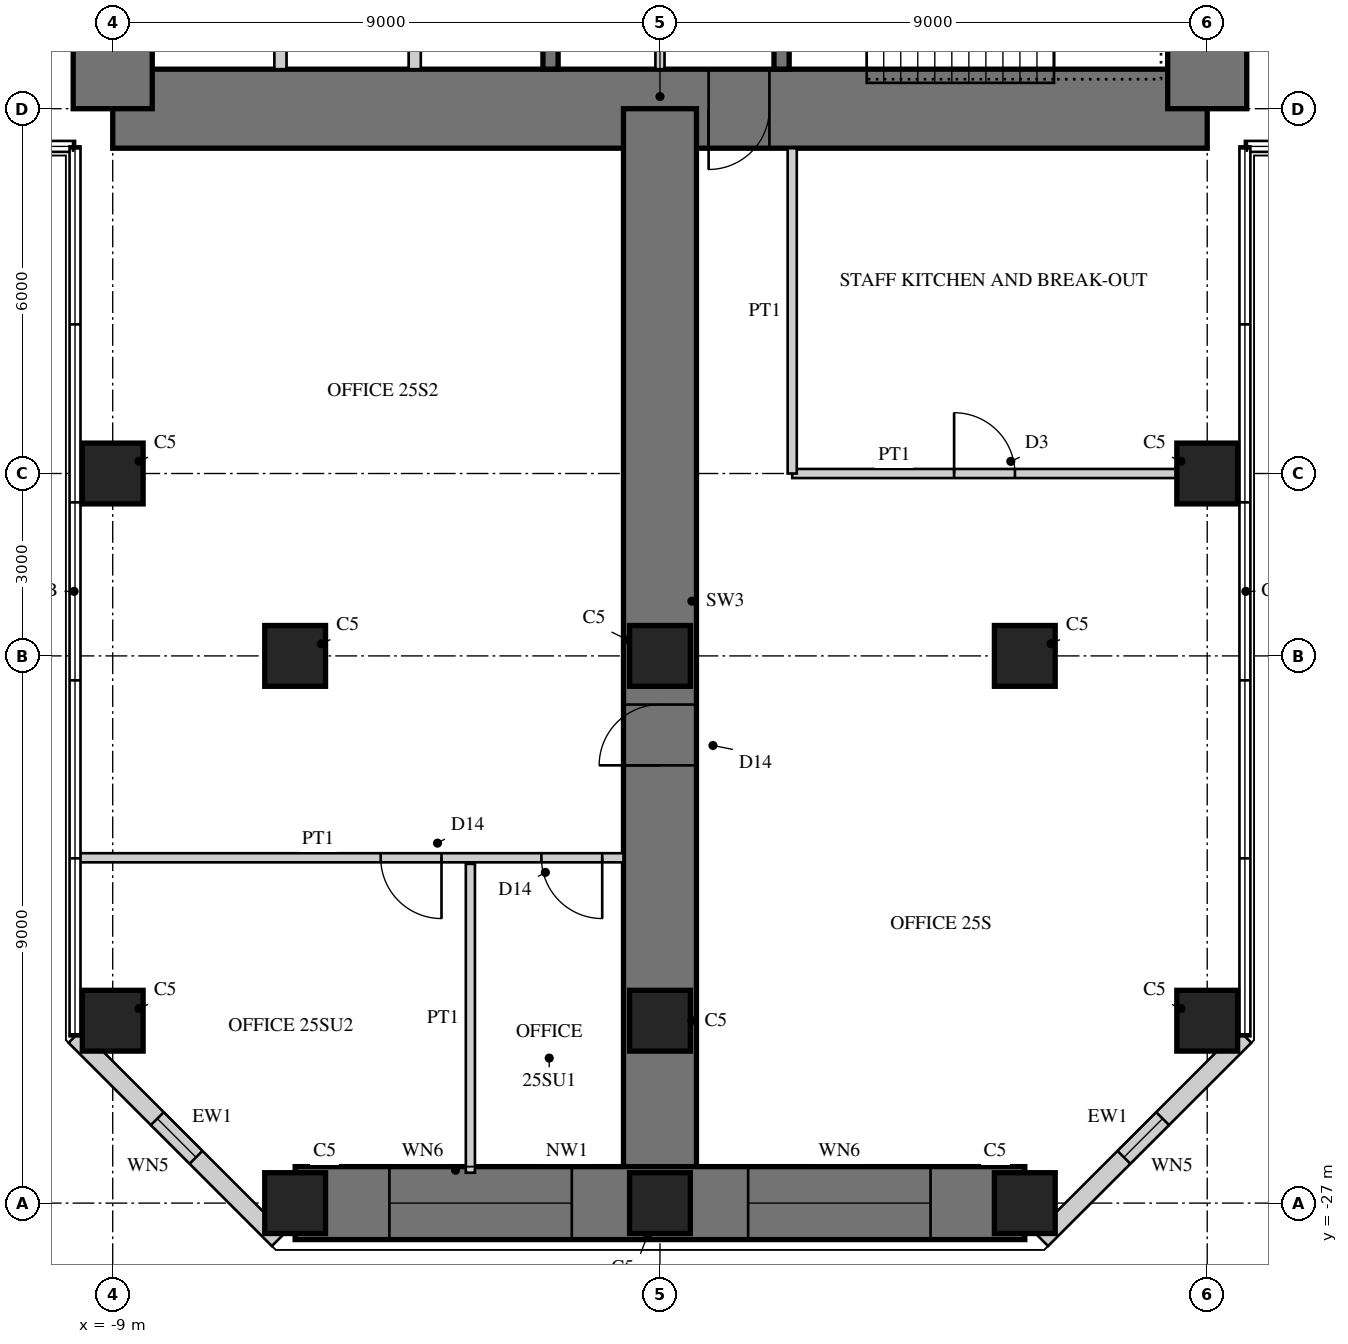
"""IFC4 building model, lengths in metres.
Left out: names, types, materials, properties, quantities, classifications, styles, units other than length and angle.
Written with IfcOpenShell. Run it as: python <this file> out.ifc"""

import sys

from ifc_helpers import new_model, si_unit, direction, frame, frame_2d, origin, origin_2d, place, context, subcontext, project, spatial, rectangle, hollow_rectangle, extrude, element, fill, save


model = new_model("IFC4")
c1 = context("Model", 3, precision=1e-05, world=origin(), true_north=direction((0.0, 1.0)))
c2 = subcontext(c1, "Body", "Model", "MODEL_VIEW")
j1 = project(units=[si_unit("LENGTHUNIT", "METRE"), si_unit("PLANEANGLEUNIT", "RADIAN")], contexts=[c1])
p1 = place(None, origin())
s1 = spatial("IfcSite", under=j1, at=p1, CompositionType="ELEMENT")
p2 = place(p1, origin())
s2 = spatial("IfcBuilding", under=s1, at=p2, CompositionType="ELEMENT")
p3 = place(p2, frame((0.0, 0.0, 104.5)))
s3 = spatial("IfcBuildingStorey", under=s2, at=p3, CompositionType="ELEMENT", Elevation=104.5)
p4 = place(p3, frame((-9.0, -9.0, 0.0), z_axis=(0.0, 0.0, 1.0), x_axis=(1.0, 0.0, 0.0)))
e1 = element("IfcWall", 1, at=p4, inside=s3, PredefinedType="SHEAR", context=c2, shape_type="SweptSolid", body=[
    extrude(rectangle(XDim=18.0, YDim=1.3, at=frame_2d((9.0, 0.0))), origin(), (0.0, 0.0, 1.0), 4.0),
])
p5 = place(p4, frame((9.8, 0.0, 0.0)))
e2 = element("IfcOpeningElement", 2, at=p5, cuts=e1, PredefinedType="OPENING", context=c2, shape_type="SweptSolid", body=[
    extrude(rectangle(XDim=1.0, YDim=2.4, at=frame_2d((0.5, 1.2))), frame((0.0, 0.66, 0.0), z_axis=(0.0, -1.0, 0.0), x_axis=(1.0, 0.0, 0.0)), (0.0, 0.0, 1.0), 1.32),
])
p6 = place(p3, frame((9.0, -9.0, 0.0), z_axis=(0.0, 0.0, 1.0), x_axis=(0.0, 1.0, 0.0)))
e3 = element("IfcWall", 3, at=p6, inside=s3, PredefinedType="SHEAR", context=c2, shape_type="SweptSolid", body=[
    extrude(rectangle(XDim=18.0, YDim=1.3, at=frame_2d((9.0, 0.0))), origin(), (0.0, 0.0, 1.0), 4.0),
])
p7 = place(p6, frame((9.8, 0.0, 0.0)))
e4 = element("IfcOpeningElement", 4, at=p7, cuts=e3, PredefinedType="OPENING", context=c2, shape_type="SweptSolid", body=[
    extrude(rectangle(XDim=1.0, YDim=2.4, at=frame_2d((0.5, 1.2))), frame((0.0, 0.66, 0.0), z_axis=(0.0, -1.0, 0.0), x_axis=(1.0, 0.0, 0.0)), (0.0, 0.0, 1.0), 1.32),
])
p8 = place(p3, frame((-9.0, 9.0, 0.0), z_axis=(0.0, 0.0, 1.0), x_axis=(0.0, -1.0, 0.0)))
e5 = element("IfcWall", 5, at=p8, inside=s3, PredefinedType="SHEAR", context=c2, shape_type="SweptSolid", body=[
    extrude(rectangle(XDim=18.0, YDim=1.3, at=frame_2d((9.0, 0.0))), origin(), (0.0, 0.0, 1.0), 4.0),
])
p9 = place(p8, frame((9.8, 0.0, 0.0)))
e6 = element("IfcOpeningElement", 6, at=p9, cuts=e5, PredefinedType="OPENING", context=c2, shape_type="SweptSolid", body=[
    extrude(rectangle(XDim=1.0, YDim=2.4, at=frame_2d((0.5, 1.2))), frame((0.0, 0.66, 0.0), z_axis=(0.0, -1.0, 0.0), x_axis=(1.0, 0.0, 0.0)), (0.0, 0.0, 1.0), 1.32),
])
p10 = place(p3, frame((-1.8, -1.875, 0.0), z_axis=(0.0, 0.0, 1.0), x_axis=(0.0, -1.0, 0.0)))
e7 = element("IfcWall", 7, at=p10, inside=s3, PredefinedType="SHEAR", context=c2, shape_type="SweptSolid", body=[
    extrude(rectangle(XDim=6.475, YDim=0.25, at=frame_2d((3.238, 0.0))), origin(), (0.0, 0.0, 1.0), 4.0),
])
p11 = place(p10, frame((1.875, 0.0, 0.0)))
e8 = element("IfcOpeningElement", 8, at=p11, cuts=e7, PredefinedType="OPENING", context=c2, shape_type="SweptSolid", body=[
    extrude(rectangle(XDim=1.6, YDim=2.4, at=frame_2d((0.8, 1.2))), frame((0.0, 0.135, 0.0), z_axis=(0.0, -1.0, 0.0), x_axis=(1.0, 0.0, 0.0)), (0.0, 0.0, 1.0), 0.27),
])
for number, where, z_axis, x_axis in (
    (9, (-4.033, -5.975, 0.0), (0.0, 0.0, 1.0), (0.0, -1.0, 0.0)),
    (10, (-6.242, -5.975, 0.0), (0.0, 0.0, 1.0), (0.0, -1.0, 0.0)),
):
    element("IfcWall", number, at=place(p3, frame(where, z_axis=z_axis, x_axis=x_axis)), inside=s3, PredefinedType="PARTITIONING", context=c2, shape_type="SweptSolid", body=[
        extrude(rectangle(XDim=2.375, YDim=0.2, at=frame_2d((1.188, 0.0))), origin(), (0.0, 0.0, 1.0), 4.0),
    ])
p12 = place(p3, frame((2.0, -1.675, 0.0), z_axis=(0.0, 0.0, 1.0), x_axis=(0.0, -1.0, 0.0)))
e11 = element("IfcWall", 11, at=p12, inside=s3, PredefinedType="SHEAR", context=c2, shape_type="SweptSolid", body=[
    extrude(rectangle(XDim=6.675, YDim=0.25, at=frame_2d((3.337, 0.0))), origin(), (0.0, 0.0, 1.0), 4.0),
])
p13 = place(p12, frame((0.725, 0.0, 0.0)))
e12 = element("IfcOpeningElement", 12, at=p13, cuts=e11, PredefinedType="OPENING", context=c2, shape_type="SweptSolid", body=[
    extrude(rectangle(XDim=1.0, YDim=2.1, at=frame_2d((0.5, 1.05))), frame((0.0, 0.135, 0.0), z_axis=(0.0, -1.0, 0.0), x_axis=(1.0, 0.0, 0.0)), (0.0, 0.0, 1.0), 0.27),
])
p14 = place(p3, frame((0.0, -9.0, 0.0), z_axis=(0.0, 0.0, 1.0), x_axis=(0.0, -1.0, 0.0)))
e13 = element("IfcWall", 13, at=p14, inside=s3, PredefinedType="SHEAR", context=c2, shape_type="SweptSolid", body=[
    extrude(rectangle(XDim=18.0, YDim=1.2, at=frame_2d((9.0, 0.0))), origin(), (0.0, 0.0, 1.0), 4.0),
])
p15 = place(p14, frame((9.8, 0.0, 0.0)))
e14 = element("IfcOpeningElement", 14, at=p15, cuts=e13, PredefinedType="OPENING", context=c2, shape_type="SweptSolid", body=[
    extrude(rectangle(XDim=1.0, YDim=2.2, at=frame_2d((0.5, 1.1))), frame((0.0, 0.61, 0.0), z_axis=(0.0, -1.0, 0.0), x_axis=(1.0, 0.0, 0.0)), (0.0, 0.0, 1.0), 1.22),
])
p16 = place(p3, frame((-6.0, -27.0, 0.0), z_axis=(0.0, 0.0, 1.0), x_axis=(1.0, 0.0, 0.0)))
e15 = element("IfcWall", 15, at=p16, inside=s3, PredefinedType="SHEAR", context=c2, shape_type="SweptSolid", body=[
    extrude(rectangle(XDim=12.0, YDim=1.2, at=frame_2d((6.0, 0.0))), origin(), (0.0, 0.0, 1.0), 4.0),
])
p17 = place(p16, frame((1.55, 0.0, 0.6)))
e16 = element("IfcOpeningElement", 16, at=p17, cuts=e15, PredefinedType="OPENING", context=c2, shape_type="SweptSolid", body=[
    extrude(rectangle(XDim=3.0, YDim=2.4, at=frame_2d((1.5, 1.2))), frame((0.0, 0.61, 0.0), z_axis=(0.0, -1.0, 0.0), x_axis=(1.0, 0.0, 0.0)), (0.0, 0.0, 1.0), 1.22),
])
p18 = place(p16, frame((7.45, 0.0, 0.6)))
e17 = element("IfcOpeningElement", 17, at=p18, cuts=e15, PredefinedType="OPENING", context=c2, shape_type="SweptSolid", body=[
    extrude(rectangle(XDim=3.0, YDim=2.4, at=frame_2d((1.5, 1.2))), frame((0.0, 0.61, 0.0), z_axis=(0.0, -1.0, 0.0), x_axis=(1.0, 0.0, 0.0)), (0.0, 0.0, 1.0), 1.22),
])
for number, where, z_axis, x_axis in (
    (18, (-9.0, -15.0, 0.0), (0.0, 0.0, 1.0), (1.0, 0.0, 0.0)),
    (19, (-9.0, -24.0, 0.0), (0.0, 0.0, 1.0), (1.0, 0.0, 0.0)),
    (20, (9.0, -15.0, 0.0), (0.0, 0.0, 1.0), (1.0, 0.0, 0.0)),
    (21, (9.0, -24.0, 0.0), (0.0, 0.0, 1.0), (1.0, 0.0, 0.0)),
    (22, (-6.0, -27.0, 0.0), (0.0, 0.0, 1.0), (1.0, 0.0, 0.0)),
    (23, (0.0, -27.0, 0.0), (0.0, 0.0, 1.0), (1.0, 0.0, 0.0)),
    (24, (6.0, -27.0, 0.0), (0.0, 0.0, 1.0), (1.0, 0.0, 0.0)),
    (25, (-6.0, -18.0, 0.0), (0.0, 0.0, 1.0), (1.0, 0.0, 0.0)),
    (26, (0.0, -18.0, 0.0), (0.0, 0.0, 1.0), (1.0, 0.0, 0.0)),
    (27, (6.0, -18.0, 0.0), (0.0, 0.0, 1.0), (1.0, 0.0, 0.0)),
    (28, (0.0, -24.0, 0.0), (0.0, 0.0, 1.0), (1.0, 0.0, 0.0)),
):
    element("IfcColumn", number, at=place(p3, frame(where, z_axis=z_axis, x_axis=x_axis)), inside=s3, PredefinedType="COLUMN", context=c2, shape_type="SweptSolid", body=[
        extrude(rectangle(XDim=1.0, YDim=1.0, at=origin_2d()), origin(), (0.0, 0.0, 1.0), 4.0),
    ])
p19 = place(p3, frame((-9.62, -24.257, 0.0), z_axis=(0.0, 0.0, 1.0), x_axis=(0.707106781187, -0.707106781187, 0.0)))
e29 = element("IfcWall", 29, at=p19, inside=s3, PredefinedType="SOLIDWALL", context=c2, shape_type="SweptSolid", body=[
    extrude(rectangle(XDim=4.728, YDim=0.3, at=frame_2d((2.364, 0.0))), origin(), (0.0, 0.0, 1.0), 3.8),
])
p20 = place(p19, frame((1.914, 0.0, 0.3)))
e30 = element("IfcOpeningElement", 30, at=p20, cuts=e29, PredefinedType="OPENING", context=c2, shape_type="SweptSolid", body=[
    extrude(rectangle(XDim=0.9, YDim=2.4, at=frame_2d((0.45, 1.2))), frame((0.0, 0.16, 0.0), z_axis=(0.0, -1.0, 0.0), x_axis=(1.0, 0.0, 0.0)), (0.0, 0.0, 1.0), 0.32),
])
p21 = place(p3, frame((6.277, -27.6, 0.0), z_axis=(0.0, 0.0, 1.0), x_axis=(0.707106781187, 0.707106781187, 0.0)))
e31 = element("IfcWall", 31, at=p21, inside=s3, PredefinedType="SOLIDWALL", context=c2, shape_type="SweptSolid", body=[
    extrude(rectangle(XDim=4.728, YDim=0.3, at=frame_2d((2.364, 0.0))), origin(), (0.0, 0.0, 1.0), 3.8),
])
p22 = place(p21, frame((1.914, 0.0, 0.3)))
e32 = element("IfcOpeningElement", 32, at=p22, cuts=e31, PredefinedType="OPENING", context=c2, shape_type="SweptSolid", body=[
    extrude(rectangle(XDim=0.9, YDim=2.4, at=frame_2d((0.45, 1.2))), frame((0.0, 0.16, 0.0), z_axis=(0.0, -1.0, 0.0), x_axis=(1.0, 0.0, 0.0)), (0.0, 0.0, 1.0), 0.32),
])
p23 = place(p3, frame((0.0, -5.675, 0.0), z_axis=(0.0, 0.0, 1.0), x_axis=(0.0, -1.0, 0.0)))
e33 = element("IfcWall", 33, at=p23, inside=s3, PredefinedType="PARTITIONING", context=c2, shape_type="SweptSolid", body=[
    extrude(rectangle(XDim=2.675, YDim=0.15, at=frame_2d((1.337, 0.0))), origin(), (0.0, 0.0, 1.0), 3.8),
])
p24 = place(p23, frame((0.4, 0.0, 0.0)))
e34 = element("IfcOpeningElement", 34, at=p24, cuts=e33, PredefinedType="OPENING", context=c2, shape_type="SweptSolid", body=[
    extrude(rectangle(XDim=1.0, YDim=2.1, at=frame_2d((0.5, 1.05))), frame((0.0, 0.085, 0.0), z_axis=(0.0, -1.0, 0.0), x_axis=(1.0, 0.0, 0.0)), (0.0, 0.0, 1.0), 0.17),
])
p25 = place(p3, frame((2.175, -15.0, 0.0), z_axis=(0.0, 0.0, 1.0), x_axis=(1.0, 0.0, 0.0)))
e35 = element("IfcWall", 35, at=p25, inside=s3, PredefinedType="PARTITIONING", context=c2, shape_type="SweptSolid", body=[
    extrude(rectangle(XDim=6.325, YDim=0.15, at=frame_2d((3.163, 0.0))), origin(), (0.0, 0.0, 1.0), 3.0),
])
p26 = place(p25, frame((2.663, 0.0, 0.0)))
e36 = element("IfcOpeningElement", 36, at=p26, cuts=e35, PredefinedType="OPENING", context=c2, shape_type="SweptSolid", body=[
    extrude(rectangle(XDim=1.0, YDim=2.1, at=frame_2d((0.5, 1.05))), frame((0.0, 0.085, 0.0), z_axis=(0.0, -1.0, 0.0), x_axis=(1.0, 0.0, 0.0)), (0.0, 0.0, 1.0), 0.17),
])
p27 = place(p3, frame((2.175, -9.65, 0.0), z_axis=(0.0, 0.0, 1.0), x_axis=(0.0, -1.0, 0.0)))
e37 = element("IfcWall", 37, at=p27, inside=s3, PredefinedType="PARTITIONING", context=c2, shape_type="SweptSolid", body=[
    extrude(rectangle(XDim=5.35, YDim=0.15, at=frame_2d((2.675, 0.0))), origin(), (0.0, 0.0, 1.0), 3.8),
])
p28 = place(p3, frame((-3.118, -21.42, 0.0), z_axis=(0.0, 0.0, 1.0), x_axis=(0.0, -1.0, 0.0)))
e38 = element("IfcWall", 38, at=p28, inside=s3, PredefinedType="PARTITIONING", context=c2, shape_type="SweptSolid", body=[
    extrude(rectangle(XDim=5.08, YDim=0.15, at=frame_2d((2.54, 0.0))), origin(), (0.0, 0.0, 1.0), 3.8),
])
p29 = place(p3, frame((-9.58, -21.32, 0.0), z_axis=(0.0, 0.0, 1.0), x_axis=(1.0, 0.0, 0.0)))
e39 = element("IfcWall", 39, at=p29, inside=s3, PredefinedType="PARTITIONING", context=c2, shape_type="SweptSolid", body=[
    extrude(rectangle(XDim=8.98, YDim=0.15, at=frame_2d((4.49, 0.0))), origin(), (0.0, 0.0, 1.0), 3.8),
])
p30 = place(p29, frame((4.987, 0.0, 0.0)))
e40 = element("IfcOpeningElement", 40, at=p30, cuts=e39, PredefinedType="OPENING", context=c2, shape_type="SweptSolid", body=[
    extrude(rectangle(XDim=1.0, YDim=2.2, at=frame_2d((0.5, 1.1))), frame((0.0, 0.085, 0.0), z_axis=(0.0, -1.0, 0.0), x_axis=(1.0, 0.0, 0.0)), (0.0, 0.0, 1.0), 0.17),
])
p31 = place(p29, frame((7.63, 0.0, 0.0)))
e41 = element("IfcOpeningElement", 41, at=p31, cuts=e39, PredefinedType="OPENING", context=c2, shape_type="SweptSolid", body=[
    extrude(rectangle(XDim=1.0, YDim=2.2, at=frame_2d((0.5, 1.1))), frame((0.0, 0.085, 0.0), z_axis=(0.0, -1.0, 0.0), x_axis=(1.0, 0.0, 0.0)), (0.0, 0.0, 1.0), 0.17),
])
p32 = place(p20, origin())
e42 = element("IfcWindow", 42, at=p32, inside=s3, PartitioningType="SINGLE_PANEL", PredefinedType="WINDOW", context=c2, shape_type="SweptSolid", body=[
    extrude(hollow_rectangle(XDim=0.9, YDim=2.4, WallThickness=0.06, at=frame_2d((0.45, 1.2))), frame((0.0, 0.03, 0.0), z_axis=(0.0, -1.0, 0.0), x_axis=(1.0, 0.0, 0.0)), (0.0, 0.0, 1.0), 0.06),
    extrude(rectangle(XDim=0.779, YDim=2.279, at=frame_2d((0.45, 1.2))), frame((0.0, 0.03, 0.0), z_axis=(0.0, -1.0, 0.0), x_axis=(1.0, 0.0, 0.0)), (0.0, 0.0, 1.0), 0.06),
])
fill(e30, e42)
p33 = place(p17, origin())
e43 = element("IfcWindow", 43, at=p33, inside=s3, PartitioningType="SINGLE_PANEL", PredefinedType="WINDOW", context=c2, shape_type="SweptSolid", body=[
    extrude(hollow_rectangle(XDim=3.0, YDim=2.4, WallThickness=0.06, at=frame_2d((1.5, 1.2))), frame((0.0, 0.03, 0.0), z_axis=(0.0, -1.0, 0.0), x_axis=(1.0, 0.0, 0.0)), (0.0, 0.0, 1.0), 0.06),
    extrude(rectangle(XDim=2.879, YDim=2.279, at=frame_2d((1.5, 1.2))), frame((0.0, 0.03, 0.0), z_axis=(0.0, -1.0, 0.0), x_axis=(1.0, 0.0, 0.0)), (0.0, 0.0, 1.0), 0.06),
])
fill(e16, e43)
p34 = place(p18, origin())
e44 = element("IfcWindow", 44, at=p34, inside=s3, PartitioningType="SINGLE_PANEL", PredefinedType="WINDOW", context=c2, shape_type="SweptSolid", body=[
    extrude(hollow_rectangle(XDim=3.0, YDim=2.4, WallThickness=0.06, at=frame_2d((1.5, 1.2))), frame((0.0, 0.03, 0.0), z_axis=(0.0, -1.0, 0.0), x_axis=(1.0, 0.0, 0.0)), (0.0, 0.0, 1.0), 0.06),
    extrude(rectangle(XDim=2.879, YDim=2.279, at=frame_2d((1.5, 1.2))), frame((0.0, 0.03, 0.0), z_axis=(0.0, -1.0, 0.0), x_axis=(1.0, 0.0, 0.0)), (0.0, 0.0, 1.0), 0.06),
])
fill(e17, e44)
p35 = place(p22, origin())
e45 = element("IfcWindow", 45, at=p35, inside=s3, PartitioningType="SINGLE_PANEL", PredefinedType="WINDOW", context=c2, shape_type="SweptSolid", body=[
    extrude(hollow_rectangle(XDim=0.9, YDim=2.4, WallThickness=0.06, at=frame_2d((0.45, 1.2))), frame((0.0, 0.03, 0.0), z_axis=(0.0, -1.0, 0.0), x_axis=(1.0, 0.0, 0.0)), (0.0, 0.0, 1.0), 0.06),
    extrude(rectangle(XDim=0.779, YDim=2.279, at=frame_2d((0.45, 1.2))), frame((0.0, 0.03, 0.0), z_axis=(0.0, -1.0, 0.0), x_axis=(1.0, 0.0, 0.0)), (0.0, 0.0, 1.0), 0.06),
])
fill(e32, e45)
p36 = place(p26, origin())
e46 = element("IfcDoor", 46, at=p36, inside=s3, OperationType="SINGLE_SWING_LEFT", PredefinedType="DOOR", context=c2, shape_type="SweptSolid", body=[
    extrude(rectangle(XDim=1.0, YDim=2.1, at=frame_2d((0.5, 1.05))), frame((0.0, 0.025, 0.0), z_axis=(0.0, -1.0, 0.0), x_axis=(1.0, 0.0, 0.0)), (0.0, 0.0, 1.0), 0.05),
])
fill(e36, e46)
p37 = place(p30, frame((1.0, 0.0, 0.0), z_axis=(0.0, 0.0, 1.0), x_axis=(-1.0, 0.0, 0.0)))
e47 = element("IfcDoor", 47, at=p37, inside=s3, OperationType="SINGLE_SWING_LEFT", PredefinedType="DOOR", context=c2, shape_type="SweptSolid", body=[
    extrude(rectangle(XDim=1.0, YDim=2.2, at=frame_2d((0.5, 1.1))), frame((0.0, 0.025, 0.0), z_axis=(0.0, -1.0, 0.0), x_axis=(1.0, 0.0, 0.0)), (0.0, 0.0, 1.0), 0.05),
])
fill(e40, e47)
p38 = place(p31, frame((1.0, 0.0, 0.0), z_axis=(0.0, 0.0, 1.0), x_axis=(-1.0, 0.0, 0.0)))
e48 = element("IfcDoor", 48, at=p38, inside=s3, OperationType="SINGLE_SWING_LEFT", PredefinedType="DOOR", context=c2, shape_type="SweptSolid", body=[
    extrude(rectangle(XDim=1.0, YDim=2.2, at=frame_2d((0.5, 1.1))), frame((0.0, 0.025, 0.0), z_axis=(0.0, -1.0, 0.0), x_axis=(1.0, 0.0, 0.0)), (0.0, 0.0, 1.0), 0.05),
])
fill(e41, e48)
p39 = place(p15, frame((1.0, 0.0, 0.0), z_axis=(0.0, 0.0, 1.0), x_axis=(-1.0, 0.0, 0.0)))
e49 = element("IfcDoor", 49, at=p39, inside=s3, OperationType="SINGLE_SWING_LEFT", PredefinedType="DOOR", context=c2, shape_type="SweptSolid", body=[
    extrude(rectangle(XDim=1.0, YDim=2.2, at=frame_2d((0.5, 1.1))), frame((0.0, 0.025, 0.0), z_axis=(0.0, -1.0, 0.0), x_axis=(1.0, 0.0, 0.0)), (0.0, 0.0, 1.0), 0.05),
])
fill(e14, e49)
p40 = place(p5, frame((1.0, 0.0, 0.0), z_axis=(0.0, 0.0, 1.0), x_axis=(-1.0, 0.0, 0.0)))
e50 = element("IfcDoor", 50, at=p40, inside=s3, OperationType="SINGLE_SWING_RIGHT", PredefinedType="DOOR", context=c2, shape_type="SweptSolid", body=[
    extrude(rectangle(XDim=1.0, YDim=2.4, at=frame_2d((0.5, 1.2))), frame((0.0, -0.005, 0.0), z_axis=(0.0, -1.0, 0.0), x_axis=(1.0, 0.0, 0.0)), (0.0, 0.0, 1.0), 0.05),
])
fill(e2, e50)
save(model, sys.argv[1])
